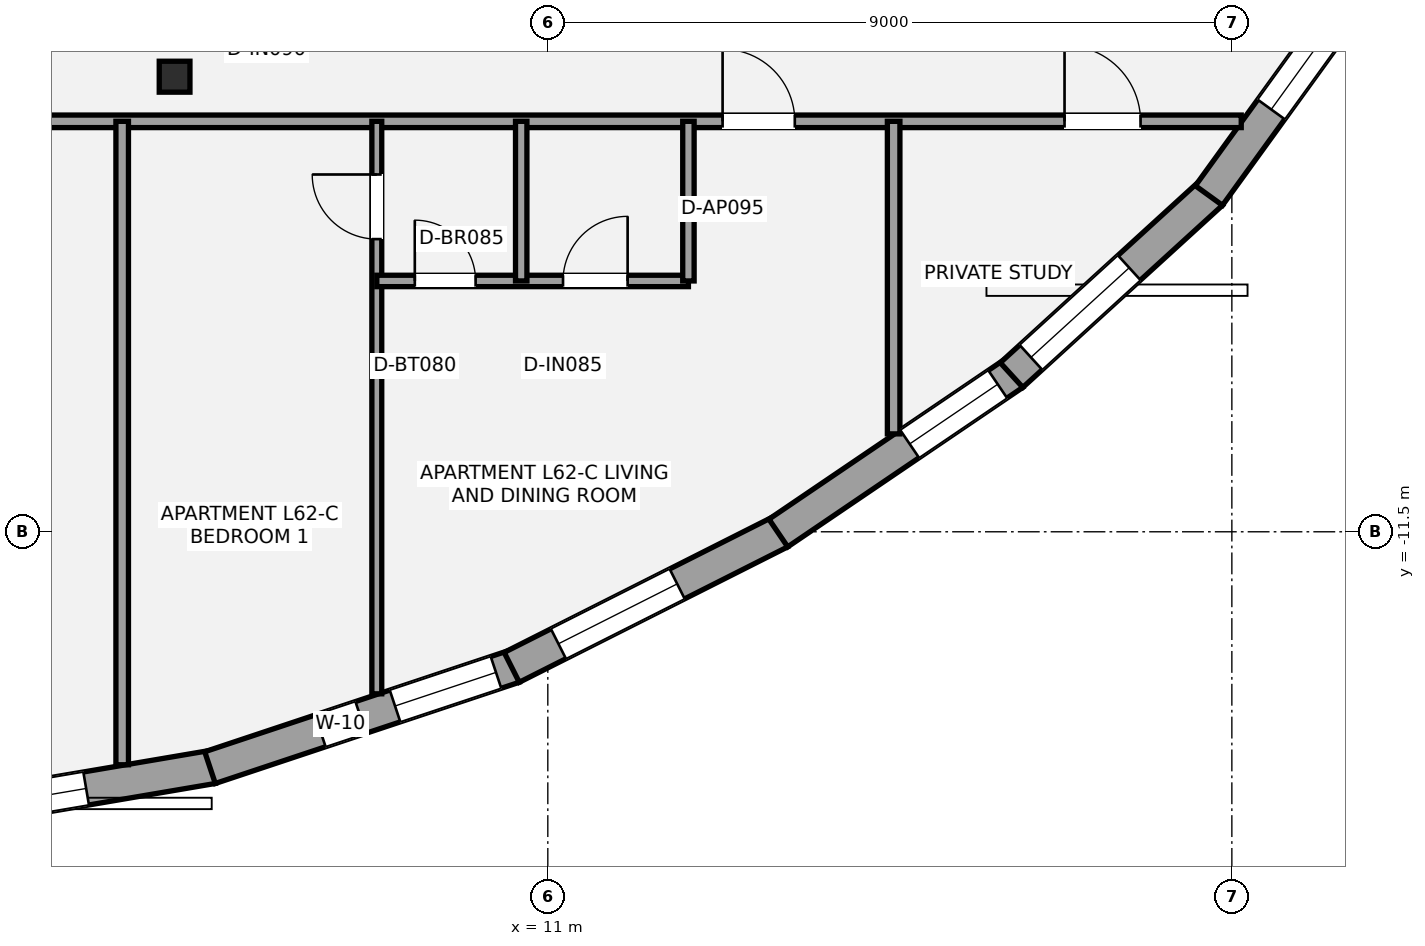
"""IFC4 building model, lengths in metres.
Left out: names, types, materials, properties, quantities, classifications, styles, units other than length and angle.
Written with IfcOpenShell. Run it as: python <this file> out.ifc"""

import sys

from ifc_helpers import new_model, si_unit, direction, frame, frame_2d, origin, origin_2d, place, context, subcontext, project, spatial, rectangle, i_section, extrude, element, fill, save


model = new_model("IFC4")
c1 = context("Model", 3, precision=1e-05, world=origin(), true_north=direction((0.0, 1.0)))
c2 = subcontext(c1, "Body", "Model", "MODEL_VIEW")
j1 = project(units=[si_unit("LENGTHUNIT", "METRE"), si_unit("PLANEANGLEUNIT", "RADIAN")], contexts=[c1])
p1 = place(None, origin())
s1 = spatial("IfcSite", under=j1, at=p1, CompositionType="ELEMENT")
p2 = place(p1, origin())
s2 = spatial("IfcBuilding", under=s1, at=p2, CompositionType="ELEMENT")
p3 = place(p2, frame((0.0, 0.0, 222.6)))
s3 = spatial("IfcBuildingStorey", under=s2, at=p3, CompositionType="ELEMENT", Elevation=222.6)
p4 = place(p3, frame((6.09, -5.513, 0.0), z_axis=(0.0, 0.0, 1.0), x_axis=(1.0, 0.0, 0.0)))
e1 = element("IfcColumn", 1, at=p4, inside=s3, PredefinedType="COLUMN", context=c2, shape_type="SweptSolid", body=[
    extrude(i_section(OverallWidth=0.404, OverallDepth=0.407, WebThickness=0.027, FlangeThickness=0.044, at=origin_2d()), origin(), (0.0, 0.0, 1.0), 3.15),
])
p5 = place(p3, frame((6.588, -14.594, 0.0), z_axis=(0.0, 0.0, 1.0), x_axis=(-0.985849288176, -0.16763406874, 0.0)))
e2 = element("IfcWall", 2, at=p5, inside=s3, PredefinedType="STANDARD", context=c2, shape_type="SweptSolid", body=[
    extrude(rectangle(XDim=4.429, YDim=0.44, at=frame_2d((2.214, 0.0))), origin(), (0.0, 0.0, 1.0), 2.336),
])
p6 = place(p5, frame((1.686, 0.0, 0.55)))
e3 = element("IfcOpeningElement", 3, at=p6, cuts=e2, PredefinedType="OPENING", context=c2, shape_type="SweptSolid", body=[
    extrude(rectangle(XDim=1.75, YDim=1.55, at=frame_2d((0.875, 0.775))), frame((0.0, 0.23, 0.0), z_axis=(0.0, -1.0, 0.0), x_axis=(1.0, 0.0, 0.0)), (0.0, 0.0, 1.0), 0.46),
])
p7 = place(p3, frame((10.555, -13.271, 0.0), z_axis=(0.0, 0.0, 1.0), x_axis=(-0.948810648135, -0.315845459024, 0.0)))
e4 = element("IfcWall", 4, at=p7, inside=s3, PredefinedType="STANDARD", context=c2, shape_type="SweptSolid", body=[
    extrude(rectangle(XDim=4.215, YDim=0.44, at=frame_2d((2.107, 0.0))), origin(), (0.0, 0.0, 1.0), 2.336),
])
p8 = place(p7, frame((0.249, 0.0, 0.55)))
e5 = element("IfcOpeningElement", 5, at=p8, cuts=e4, PredefinedType="OPENING", context=c2, shape_type="SweptSolid", body=[
    extrude(rectangle(XDim=1.4, YDim=1.55, at=frame_2d((0.7, 0.775))), frame((0.0, 0.23, 0.0), z_axis=(0.0, -1.0, 0.0), x_axis=(1.0, 0.0, 0.0)), (0.0, 0.0, 1.0), 0.46),
])
p9 = place(p7, frame((2.125, 0.0, 0.88)))
e6 = element("IfcOpeningElement", 6, at=p9, cuts=e4, PredefinedType="OPENING", context=c2, shape_type="SweptSolid", body=[
    extrude(rectangle(XDim=0.56, YDim=1.15, at=frame_2d((0.28, 0.575))), frame((0.0, 0.23, 0.0), z_axis=(0.0, -1.0, 0.0), x_axis=(1.0, 0.0, 0.0)), (0.0, 0.0, 1.0), 0.46),
])
p10 = place(p3, frame((14.057, -11.502, 0.0), z_axis=(0.0, 0.0, 1.0), x_axis=(-0.892866610217, -0.450321236851, 0.0)))
e7 = element("IfcWall", 7, at=p10, inside=s3, PredefinedType="STANDARD", context=c2, shape_type="SweptSolid", body=[
    extrude(rectangle(XDim=3.956, YDim=0.44, at=frame_2d((1.978, 0.0))), origin(), (0.0, 0.0, 1.0), 2.336),
])
p11 = place(p10, frame((1.518, 0.0, 0.55)))
e8 = element("IfcOpeningElement", 8, at=p11, cuts=e7, PredefinedType="OPENING", context=c2, shape_type="SweptSolid", body=[
    extrude(rectangle(XDim=1.75, YDim=1.55, at=frame_2d((0.875, 0.775))), frame((0.0, 0.23, 0.0), z_axis=(0.0, -1.0, 0.0), x_axis=(1.0, 0.0, 0.0)), (0.0, 0.0, 1.0), 0.46),
])
p12 = place(p3, frame((17.126, -9.419, 0.0), z_axis=(0.0, 0.0, 1.0), x_axis=(-0.827642668093, -0.561255391023, 0.0)))
e9 = element("IfcWall", 9, at=p12, inside=s3, PredefinedType="STANDARD", context=c2, shape_type="SweptSolid", body=[
    extrude(rectangle(XDim=3.738, YDim=0.44, at=frame_2d((1.869, 0.0))), origin(), (0.0, 0.0, 1.0), 2.336),
])
p13 = place(p12, frame((0.25, 0.0, 0.58)))
e10 = element("IfcOpeningElement", 10, at=p13, cuts=e9, PredefinedType="OPENING", context=c2, shape_type="SweptSolid", body=[
    extrude(rectangle(XDim=1.4, YDim=1.55, at=frame_2d((0.7, 0.775))), frame((0.0, 0.23, 0.0), z_axis=(0.0, -1.0, 0.0), x_axis=(1.0, 0.0, 0.0)), (0.0, 0.0, 1.0), 0.46),
])
p14 = place(p3, frame((19.728, -7.042, 0.0), z_axis=(0.0, 0.0, 1.0), x_axis=(-0.738907573949, -0.673806795129, 0.0)))
e11 = element("IfcWall", 11, at=p14, inside=s3, PredefinedType="STANDARD", context=c2, shape_type="SweptSolid", body=[
    extrude(rectangle(XDim=3.555, YDim=0.44, at=frame_2d((1.778, 0.0))), origin(), (0.0, 0.0, 1.0), 2.336),
])
p15 = place(p14, frame((1.46, 0.0, 0.55)))
e12 = element("IfcOpeningElement", 12, at=p15, cuts=e11, PredefinedType="OPENING", context=c2, shape_type="SweptSolid", body=[
    extrude(rectangle(XDim=1.75, YDim=1.55, at=frame_2d((0.875, 0.775))), frame((0.0, 0.23, 0.0), z_axis=(0.0, -1.0, 0.0), x_axis=(1.0, 0.0, 0.0)), (0.0, 0.0, 1.0), 0.46),
])
p16 = place(p3, frame((21.661, -4.364, 0.0), z_axis=(0.0, 0.0, 1.0), x_axis=(-0.586344849721, -0.810061551492, 0.0)))
e13 = element("IfcWall", 13, at=p16, inside=s3, PredefinedType="STANDARD", context=c2, shape_type="SweptSolid", body=[
    extrude(rectangle(XDim=3.348, YDim=0.44, at=frame_2d((1.674, 0.0))), origin(), (0.0, 0.0, 1.0), 2.336),
])
p17 = place(p16, frame((0.2, 0.0, 0.55)))
e14 = element("IfcOpeningElement", 14, at=p17, cuts=e13, PredefinedType="OPENING", context=c2, shape_type="SweptSolid", body=[
    extrude(rectangle(XDim=1.75, YDim=1.55, at=frame_2d((0.875, 0.775))), frame((0.0, 0.23, 0.0), z_axis=(0.0, -1.0, 0.0), x_axis=(1.0, 0.0, 0.0)), (0.0, 0.0, 1.0), 0.46),
])
p18 = place(p3, frame((-20.123, -6.1, 0.0), z_axis=(0.0, 0.0, 1.0), x_axis=(1.0, 0.0, 0.0)))
e15 = element("IfcWall", 15, at=p18, inside=s3, PredefinedType="PARTITIONING", context=c2, shape_type="SweptSolid", body=[
    extrude(rectangle(XDim=40.247, YDim=0.165, at=frame_2d((20.123, 0.0))), origin(), (0.0, 0.0, 1.0), 2.423),
])
p19 = place(p18, frame((1.275, 0.0, 0.0)))
e16 = element("IfcOpeningElement", 16, at=p19, cuts=e15, PredefinedType="OPENING", context=c2, shape_type="SweptSolid", body=[
    extrude(rectangle(XDim=1.0, YDim=2.15, at=frame_2d((0.5, 1.075))), frame((0.0, 0.093, 0.0), z_axis=(0.0, -1.0, 0.0), x_axis=(1.0, 0.0, 0.0)), (0.0, 0.0, 1.0), 0.185),
])
p20 = place(p18, frame((37.922, 0.0, 0.0)))
e17 = element("IfcOpeningElement", 17, at=p20, cuts=e15, PredefinedType="OPENING", context=c2, shape_type="SweptSolid", body=[
    extrude(rectangle(XDim=1.0, YDim=2.15, at=frame_2d((0.5, 1.075))), frame((0.0, 0.093, 0.0), z_axis=(0.0, -1.0, 0.0), x_axis=(1.0, 0.0, 0.0)), (0.0, 0.0, 1.0), 0.185),
])
p21 = place(p18, frame((11.813, 0.0, 0.0)))
e18 = element("IfcOpeningElement", 18, at=p21, cuts=e15, PredefinedType="OPENING", context=c2, shape_type="SweptSolid", body=[
    extrude(rectangle(XDim=0.95, YDim=2.15, at=frame_2d((0.475, 1.075))), frame((0.0, 0.093, 0.0), z_axis=(0.0, -1.0, 0.0), x_axis=(1.0, 0.0, 0.0)), (0.0, 0.0, 1.0), 0.185),
])
p22 = place(p18, frame((22.623, 0.0, 0.0)))
e19 = element("IfcOpeningElement", 19, at=p22, cuts=e15, PredefinedType="OPENING", context=c2, shape_type="SweptSolid", body=[
    extrude(rectangle(XDim=0.95, YDim=2.15, at=frame_2d((0.475, 1.075))), frame((0.0, 0.093, 0.0), z_axis=(0.0, -1.0, 0.0), x_axis=(1.0, 0.0, 0.0)), (0.0, 0.0, 1.0), 0.185),
])
p23 = place(p18, frame((33.423, 0.0, 0.0)))
e20 = element("IfcOpeningElement", 20, at=p23, cuts=e15, PredefinedType="OPENING", context=c2, shape_type="SweptSolid", body=[
    extrude(rectangle(XDim=0.95, YDim=2.15, at=frame_2d((0.475, 1.075))), frame((0.0, 0.093, 0.0), z_axis=(0.0, -1.0, 0.0), x_axis=(1.0, 0.0, 0.0)), (0.0, 0.0, 1.0), 0.185),
])
p24 = place(p3, frame((15.55, -10.212, 0.0), z_axis=(0.0, 0.0, 1.0), x_axis=(0.0, 1.0, 0.0)))
e21 = element("IfcWall", 21, at=p24, inside=s3, PredefinedType="PARTITIONING", context=c2, shape_type="SweptSolid", body=[
    extrude(rectangle(XDim=4.112, YDim=0.165, at=frame_2d((2.056, 0.0))), origin(), (0.0, 0.0, 1.0), 2.423),
])
p25 = place(p3, frame((5.4, -14.565, 0.0), z_axis=(0.0, 0.0, 1.0), x_axis=(0.0, 1.0, 0.0)))
e22 = element("IfcWall", 22, at=p25, inside=s3, PredefinedType="PARTITIONING", context=c2, shape_type="SweptSolid", body=[
    extrude(rectangle(XDim=8.465, YDim=0.165, at=frame_2d((4.232, 0.0))), origin(), (0.0, 0.0, 1.0), 2.423),
])
p26 = place(p3, frame((8.75, -13.632, 0.0), z_axis=(0.0, 0.0, 1.0), x_axis=(0.0, 1.0, 0.0)))
e23 = element("IfcWall", 23, at=p26, inside=s3, PredefinedType="PARTITIONING", context=c2, shape_type="SweptSolid", body=[
    extrude(rectangle(XDim=7.532, YDim=0.13, at=frame_2d((3.766, 0.0))), origin(), (0.0, 0.0, 1.0), 2.97),
])
p27 = place(p26, frame((5.982, 0.0, 0.0)))
e24 = element("IfcOpeningElement", 24, at=p27, cuts=e23, PredefinedType="OPENING", context=c2, shape_type="SweptSolid", body=[
    extrude(rectangle(XDim=0.85, YDim=2.1, at=frame_2d((0.425, 1.05))), frame((0.0, 0.075, 0.0), z_axis=(0.0, -1.0, 0.0), x_axis=(1.0, 0.0, 0.0)), (0.0, 0.0, 1.0), 0.15),
])
p28 = place(p3, frame((8.75, -8.2, 0.0), z_axis=(0.0, 0.0, 1.0), x_axis=(1.0, 0.0, 0.0)))
e25 = element("IfcWall", 25, at=p28, inside=s3, PredefinedType="PLUMBINGWALL", context=c2, shape_type="SweptSolid", body=[
    extrude(rectangle(XDim=4.1, YDim=0.15, at=frame_2d((2.05, 0.0))), origin(), (0.0, 0.0, 1.0), 2.423),
])
p29 = place(p28, frame((0.5, 0.0, 0.0)))
e26 = element("IfcOpeningElement", 26, at=p29, cuts=e25, PredefinedType="OPENING", context=c2, shape_type="SweptSolid", body=[
    extrude(rectangle(XDim=0.8, YDim=2.1, at=frame_2d((0.4, 1.05))), frame((0.0, 0.085, 0.0), z_axis=(0.0, -1.0, 0.0), x_axis=(1.0, 0.0, 0.0)), (0.0, 0.0, 1.0), 0.17),
])
p30 = place(p28, frame((2.45, 0.0, 0.0)))
e27 = element("IfcOpeningElement", 27, at=p30, cuts=e25, PredefinedType="OPENING", context=c2, shape_type="SweptSolid", body=[
    extrude(rectangle(XDim=0.85, YDim=2.1, at=frame_2d((0.425, 1.05))), frame((0.0, 0.085, 0.0), z_axis=(0.0, -1.0, 0.0), x_axis=(1.0, 0.0, 0.0)), (0.0, 0.0, 1.0), 0.17),
])
p31 = place(p3, frame((10.65, -8.2, 0.0), z_axis=(0.0, 0.0, 1.0), x_axis=(0.0, 1.0, 0.0)))
e28 = element("IfcWall", 28, at=p31, inside=s3, PredefinedType="PLUMBINGWALL", context=c2, shape_type="SweptSolid", body=[
    extrude(rectangle(XDim=2.1, YDim=0.15, at=frame_2d((1.05, 0.0))), origin(), (0.0, 0.0, 1.0), 2.97),
])
p32 = place(p3, frame((12.85, -8.2, 0.0), z_axis=(0.0, 0.0, 1.0), x_axis=(0.0, 1.0, 0.0)))
e29 = element("IfcWall", 29, at=p32, inside=s3, PredefinedType="PLUMBINGWALL", context=c2, shape_type="SweptSolid", body=[
    extrude(rectangle(XDim=2.1, YDim=0.15, at=frame_2d((1.05, 0.0))), origin(), (0.0, 0.0, 1.0), 2.423),
])
p33 = place(p6, origin())
e30 = element("IfcWindow", 30, at=p33, inside=s3, PartitioningType="SINGLE_PANEL", PredefinedType="WINDOW", context=c2, shape_type="SweptSolid", body=[
    extrude(rectangle(XDim=1.75, YDim=1.55, at=frame_2d((0.875, 0.775))), frame((0.0, -0.01, 0.0), z_axis=(0.0, -1.0, 0.0), x_axis=(1.0, 0.0, 0.0)), (0.0, 0.0, 1.0), 0.06),
])
fill(e3, e30)
p34 = place(p8, origin())
e31 = element("IfcWindow", 31, at=p34, inside=s3, PartitioningType="SINGLE_PANEL", PredefinedType="WINDOW", context=c2, shape_type="SweptSolid", body=[
    extrude(rectangle(XDim=1.4, YDim=1.55, at=frame_2d((0.7, 0.775))), frame((0.0, -0.01, 0.0), z_axis=(0.0, -1.0, 0.0), x_axis=(1.0, 0.0, 0.0)), (0.0, 0.0, 1.0), 0.06),
])
fill(e5, e31)
p35 = place(p11, origin())
e32 = element("IfcWindow", 32, at=p35, inside=s3, PartitioningType="SINGLE_PANEL", PredefinedType="WINDOW", context=c2, shape_type="SweptSolid", body=[
    extrude(rectangle(XDim=1.75, YDim=1.55, at=frame_2d((0.875, 0.775))), frame((0.0, -0.01, 0.0), z_axis=(0.0, -1.0, 0.0), x_axis=(1.0, 0.0, 0.0)), (0.0, 0.0, 1.0), 0.06),
])
fill(e8, e32)
p36 = place(p13, origin())
e33 = element("IfcWindow", 33, at=p36, inside=s3, PartitioningType="SINGLE_PANEL", PredefinedType="WINDOW", context=c2, shape_type="SweptSolid", body=[
    extrude(rectangle(XDim=1.4, YDim=1.55, at=frame_2d((0.7, 0.775))), frame((0.0, -0.01, 0.0), z_axis=(0.0, -1.0, 0.0), x_axis=(1.0, 0.0, 0.0)), (0.0, 0.0, 1.0), 0.06),
])
fill(e10, e33)
p37 = place(p15, origin())
e34 = element("IfcWindow", 34, at=p37, inside=s3, PartitioningType="SINGLE_PANEL", PredefinedType="WINDOW", context=c2, shape_type="SweptSolid", body=[
    extrude(rectangle(XDim=1.75, YDim=1.55, at=frame_2d((0.875, 0.775))), frame((0.0, -0.01, 0.0), z_axis=(0.0, -1.0, 0.0), x_axis=(1.0, 0.0, 0.0)), (0.0, 0.0, 1.0), 0.06),
])
fill(e12, e34)
p38 = place(p17, origin())
e35 = element("IfcWindow", 35, at=p38, inside=s3, PartitioningType="SINGLE_PANEL", PredefinedType="WINDOW", context=c2, shape_type="SweptSolid", body=[
    extrude(rectangle(XDim=1.75, YDim=1.55, at=frame_2d((0.875, 0.775))), frame((0.0, -0.01, 0.0), z_axis=(0.0, -1.0, 0.0), x_axis=(1.0, 0.0, 0.0)), (0.0, 0.0, 1.0), 0.06),
])
fill(e14, e35)
p39 = place(p9, origin())
e36 = element("IfcWindow", 36, at=p39, inside=s3, PartitioningType="SINGLE_PANEL", PredefinedType="WINDOW", context=c2, shape_type="SweptSolid", body=[
    extrude(rectangle(XDim=0.56, YDim=1.15, at=frame_2d((0.28, 0.575))), frame((0.0, -0.01, 0.0), z_axis=(0.0, -1.0, 0.0), x_axis=(1.0, 0.0, 0.0)), (0.0, 0.0, 1.0), 0.06),
])
fill(e6, e36)
p40 = place(p20, origin())
e37 = element("IfcDoor", 37, at=p40, inside=s3, OperationType="SINGLE_SWING_LEFT", PredefinedType="DOOR", context=c2, shape_type="SweptSolid", body=[
    extrude(rectangle(XDim=1.0, YDim=2.15, at=frame_2d((0.5, 1.075))), frame((0.0, 0.025, 0.0), z_axis=(0.0, -1.0, 0.0), x_axis=(1.0, 0.0, 0.0)), (0.0, 0.0, 1.0), 0.05),
])
fill(e17, e37)
p41 = place(p27, origin())
e38 = element("IfcDoor", 38, at=p41, inside=s3, OperationType="SINGLE_SWING_RIGHT", PredefinedType="DOOR", context=c2, shape_type="SweptSolid", body=[
    extrude(rectangle(XDim=0.85, YDim=2.1, at=frame_2d((0.425, 1.05))), frame((0.0, 0.025, 0.0), z_axis=(0.0, -1.0, 0.0), x_axis=(1.0, 0.0, 0.0)), (0.0, 0.0, 1.0), 0.05),
])
fill(e24, e38)
p42 = place(p29, origin())
e39 = element("IfcDoor", 39, at=p42, inside=s3, OperationType="SINGLE_SWING_LEFT", PredefinedType="DOOR", context=c2, shape_type="SweptSolid", body=[
    extrude(rectangle(XDim=0.8, YDim=2.1, at=frame_2d((0.4, 1.05))), frame((0.0, 0.025, 0.0), z_axis=(0.0, -1.0, 0.0), x_axis=(1.0, 0.0, 0.0)), (0.0, 0.0, 1.0), 0.05),
])
fill(e26, e39)
p43 = place(p30, origin())
e40 = element("IfcDoor", 40, at=p43, inside=s3, OperationType="SINGLE_SWING_RIGHT", PredefinedType="DOOR", context=c2, shape_type="SweptSolid", body=[
    extrude(rectangle(XDim=0.85, YDim=2.1, at=frame_2d((0.425, 1.05))), frame((0.0, 0.025, 0.0), z_axis=(0.0, -1.0, 0.0), x_axis=(1.0, 0.0, 0.0)), (0.0, 0.0, 1.0), 0.05),
])
fill(e27, e40)
p44 = place(p23, origin())
e41 = element("IfcDoor", 41, at=p44, inside=s3, OperationType="SINGLE_SWING_LEFT", PredefinedType="DOOR", context=c2, shape_type="SweptSolid", body=[
    extrude(rectangle(XDim=0.95, YDim=2.15, at=frame_2d((0.475, 1.075))), frame((0.0, 0.025, 0.0), z_axis=(0.0, -1.0, 0.0), x_axis=(1.0, 0.0, 0.0)), (0.0, 0.0, 1.0), 0.05),
])
fill(e20, e41)
save(model, sys.argv[1])
